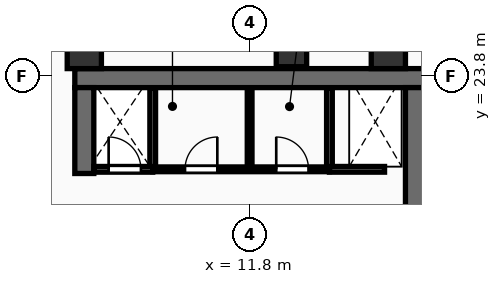
"""IFC4 building model, lengths in metres.
Left out: names, types, materials, properties, quantities, classifications, styles, units other than length and angle.
Written with IfcOpenShell. Run it as: python <this file> out.ifc"""

import sys

from ifc_helpers import new_model, si_unit, direction, frame, frame_2d, origin, origin_2d, place, context, subcontext, project, spatial, rectangle, extrude, element, fill, save


model = new_model("IFC4")
c1 = context("Model", 3, precision=1e-05, world=origin(), true_north=direction((0.0, 1.0)))
c2 = subcontext(c1, "Body", "Model", "MODEL_VIEW")
j1 = project(units=[si_unit("LENGTHUNIT", "METRE"), si_unit("PLANEANGLEUNIT", "RADIAN")], contexts=[c1])
p1 = place(None, origin())
s1 = spatial("IfcSite", under=j1, at=p1, CompositionType="ELEMENT")
p2 = place(p1, origin())
s2 = spatial("IfcBuilding", under=s1, at=p2, CompositionType="ELEMENT")
p3 = place(p2, frame((0.0, 0.0, 331.2)))
s3 = spatial("IfcBuildingStorey", under=s2, at=p3, CompositionType="ELEMENT", Elevation=331.2)
p4 = place(p3, frame((7.2, 23.75, 0.0), z_axis=(0.0, 0.0, 1.0), x_axis=(1.0, 0.0, 0.0)))
e1 = element("IfcWall", 1, at=p4, inside=s3, PredefinedType="SHEAR", context=c2, shape_type="SweptSolid", body=[
    extrude(rectangle(XDim=13.85, YDim=0.5, at=frame_2d((6.925, 0.0))), origin(), (0.0, 0.0, 1.0), 3.56),
])
p5 = place(p3, frame((7.45, 21.24, 0.0), z_axis=(0.0, 0.0, 1.0), x_axis=(0.0, 1.0, 0.0)))
e2 = element("IfcWall", 2, at=p5, inside=s3, PredefinedType="SHEAR", context=c2, shape_type="SweptSolid", body=[
    extrude(rectangle(XDim=2.26, YDim=0.5, at=frame_2d((1.13, 0.0))), origin(), (0.0, 0.0, 1.0), 3.56),
])
p6 = place(p3, frame((16.15, 14.4, 0.0), z_axis=(0.0, 0.0, 1.0), x_axis=(0.0, 1.0, 0.0)))
e3 = element("IfcWall", 3, at=p6, inside=s3, PredefinedType="SHEAR", context=c2, shape_type="SweptSolid", body=[
    extrude(rectangle(XDim=9.1, YDim=0.5, at=frame_2d((4.55, 0.0))), origin(), (0.0, 0.0, 1.0), 3.56),
])
for number, where, z_axis, x_axis in (
    (4, (7.45, 24.45, 0.0), (0.0, 0.0, 1.0), (1.0, 0.0, 0.0)),
    (5, (15.45, 24.45, 0.0), (0.0, 0.0, 1.0), (1.0, 0.0, 0.0)),
):
    element("IfcColumn", number, at=place(p3, frame(where, z_axis=z_axis, x_axis=x_axis)), inside=s3, PredefinedType="COLUMN", context=c2, shape_type="SweptSolid", body=[
        extrude(rectangle(XDim=0.9, YDim=0.9, at=origin_2d()), origin(), (0.0, 0.0, 1.0), 3.56),
    ])
p7 = place(p3, frame((12.9, 24.45, 0.0), z_axis=(0.0, 0.0, 1.0), x_axis=(1.0, 0.0, 0.0)))
e6 = element("IfcColumn", 6, at=p7, inside=s3, PredefinedType="COLUMN", context=c2, shape_type="SweptSolid", body=[
    extrude(rectangle(XDim=0.8, YDim=0.8, at=origin_2d()), origin(), (0.0, 0.0, 1.0), 3.56),
])
for number, where, z_axis, x_axis in (
    (7, (9.25, 21.35, 0.0), (0.0, 0.0, 1.0), (0.0, 1.0, 0.0)),
    (8, (13.9, 21.35, 0.0), (0.0, 0.0, 1.0), (0.0, 1.0, 0.0)),
):
    element("IfcWall", number, at=place(p3, frame(where, z_axis=z_axis, x_axis=x_axis)), inside=s3, PredefinedType="PARTITIONING", context=c2, shape_type="SweptSolid", body=[
        extrude(rectangle(XDim=2.13, YDim=0.15, at=frame_2d((1.065, 0.0))), origin(), (0.0, 0.0, 1.0), 3.56),
    ])
p8 = place(p3, frame((7.7, 21.35, 0.0), z_axis=(0.0, 0.0, 1.0), x_axis=(1.0, 0.0, 0.0)))
e9 = element("IfcWall", 9, at=p8, inside=s3, PredefinedType="PARTITIONING", context=c2, shape_type="SweptSolid", body=[
    extrude(rectangle(XDim=1.55, YDim=0.15, at=frame_2d((0.775, 0.0))), origin(), (0.0, 0.0, 1.0), 3.56),
])
p9 = place(p8, frame((0.39, 0.0, 0.0)))
e10 = element("IfcOpeningElement", 10, at=p9, cuts=e9, PredefinedType="OPENING", context=c2, shape_type="SweptSolid", body=[
    extrude(rectangle(XDim=0.85, YDim=2.15, at=frame_2d((0.425, 1.075))), frame((0.0, 0.085, 0.0), z_axis=(0.0, -1.0, 0.0), x_axis=(1.0, 0.0, 0.0)), (0.0, 0.0, 1.0), 0.17),
])
p10 = place(p3, frame((13.9, 21.35, 0.0), z_axis=(0.0, 0.0, 1.0), x_axis=(1.0, 0.0, 0.0)))
e11 = element("IfcWall", 11, at=p10, inside=s3, PredefinedType="PARTITIONING", context=c2, shape_type="SweptSolid", body=[
    extrude(rectangle(XDim=1.45, YDim=0.15, at=frame_2d((0.725, 0.0))), origin(), (0.0, 0.0, 1.0), 3.56),
])
p11 = place(p3, frame((9.25, 21.35, 0.0), z_axis=(0.0, 0.0, 1.0), x_axis=(1.0, 0.0, 0.0)))
e12 = element("IfcWall", 12, at=p11, inside=s3, PredefinedType="PARTITIONING", context=c2, shape_type="SweptSolid", body=[
    extrude(rectangle(XDim=4.65, YDim=0.125, at=frame_2d((2.325, 0.0))), origin(), (0.0, 0.0, 1.0), 3.56),
])
p12 = place(p11, frame((0.85, 0.0, 0.0)))
e13 = element("IfcOpeningElement", 13, at=p12, cuts=e12, PredefinedType="OPENING", context=c2, shape_type="SweptSolid", body=[
    extrude(rectangle(XDim=0.85, YDim=2.15, at=frame_2d((0.425, 1.075))), frame((0.0, 0.073, 0.0), z_axis=(0.0, -1.0, 0.0), x_axis=(1.0, 0.0, 0.0)), (0.0, 0.0, 1.0), 0.145),
])
p13 = place(p11, frame((3.25, 0.0, 0.0)))
e14 = element("IfcOpeningElement", 14, at=p13, cuts=e12, PredefinedType="OPENING", context=c2, shape_type="SweptSolid", body=[
    extrude(rectangle(XDim=0.85, YDim=2.15, at=frame_2d((0.425, 1.075))), frame((0.0, 0.073, 0.0), z_axis=(0.0, -1.0, 0.0), x_axis=(1.0, 0.0, 0.0)), (0.0, 0.0, 1.0), 0.145),
])
p14 = place(p3, frame((11.8, 21.35, 0.0), z_axis=(0.0, 0.0, 1.0), x_axis=(0.0, 1.0, 0.0)))
e15 = element("IfcWall", 15, at=p14, inside=s3, PredefinedType="PARTITIONING", context=c2, shape_type="SweptSolid", body=[
    extrude(rectangle(XDim=2.13, YDim=0.125, at=frame_2d((1.065, 0.0))), origin(), (0.0, 0.0, 1.0), 3.56),
])
p15 = place(p9, origin())
e16 = element("IfcDoor", 16, at=p15, inside=s3, OperationType="SINGLE_SWING_LEFT", PredefinedType="DOOR", context=c2, shape_type="SweptSolid", body=[
    extrude(rectangle(XDim=0.85, YDim=2.15, at=frame_2d((0.425, 1.075))), frame((0.0, 0.025, 0.0), z_axis=(0.0, -1.0, 0.0), x_axis=(1.0, 0.0, 0.0)), (0.0, 0.0, 1.0), 0.05),
])
fill(e10, e16)
p16 = place(p12, origin())
e17 = element("IfcDoor", 17, at=p16, inside=s3, OperationType="SINGLE_SWING_RIGHT", PredefinedType="DOOR", context=c2, shape_type="SweptSolid", body=[
    extrude(rectangle(XDim=0.85, YDim=2.15, at=frame_2d((0.425, 1.075))), frame((0.0, 0.025, 0.0), z_axis=(0.0, -1.0, 0.0), x_axis=(1.0, 0.0, 0.0)), (0.0, 0.0, 1.0), 0.05),
])
fill(e13, e17)
p17 = place(p13, origin())
e18 = element("IfcDoor", 18, at=p17, inside=s3, OperationType="SINGLE_SWING_LEFT", PredefinedType="DOOR", context=c2, shape_type="SweptSolid", body=[
    extrude(rectangle(XDim=0.85, YDim=2.15, at=frame_2d((0.425, 1.075))), frame((0.0, 0.025, 0.0), z_axis=(0.0, -1.0, 0.0), x_axis=(1.0, 0.0, 0.0)), (0.0, 0.0, 1.0), 0.05),
])
fill(e14, e18)
save(model, sys.argv[1])
